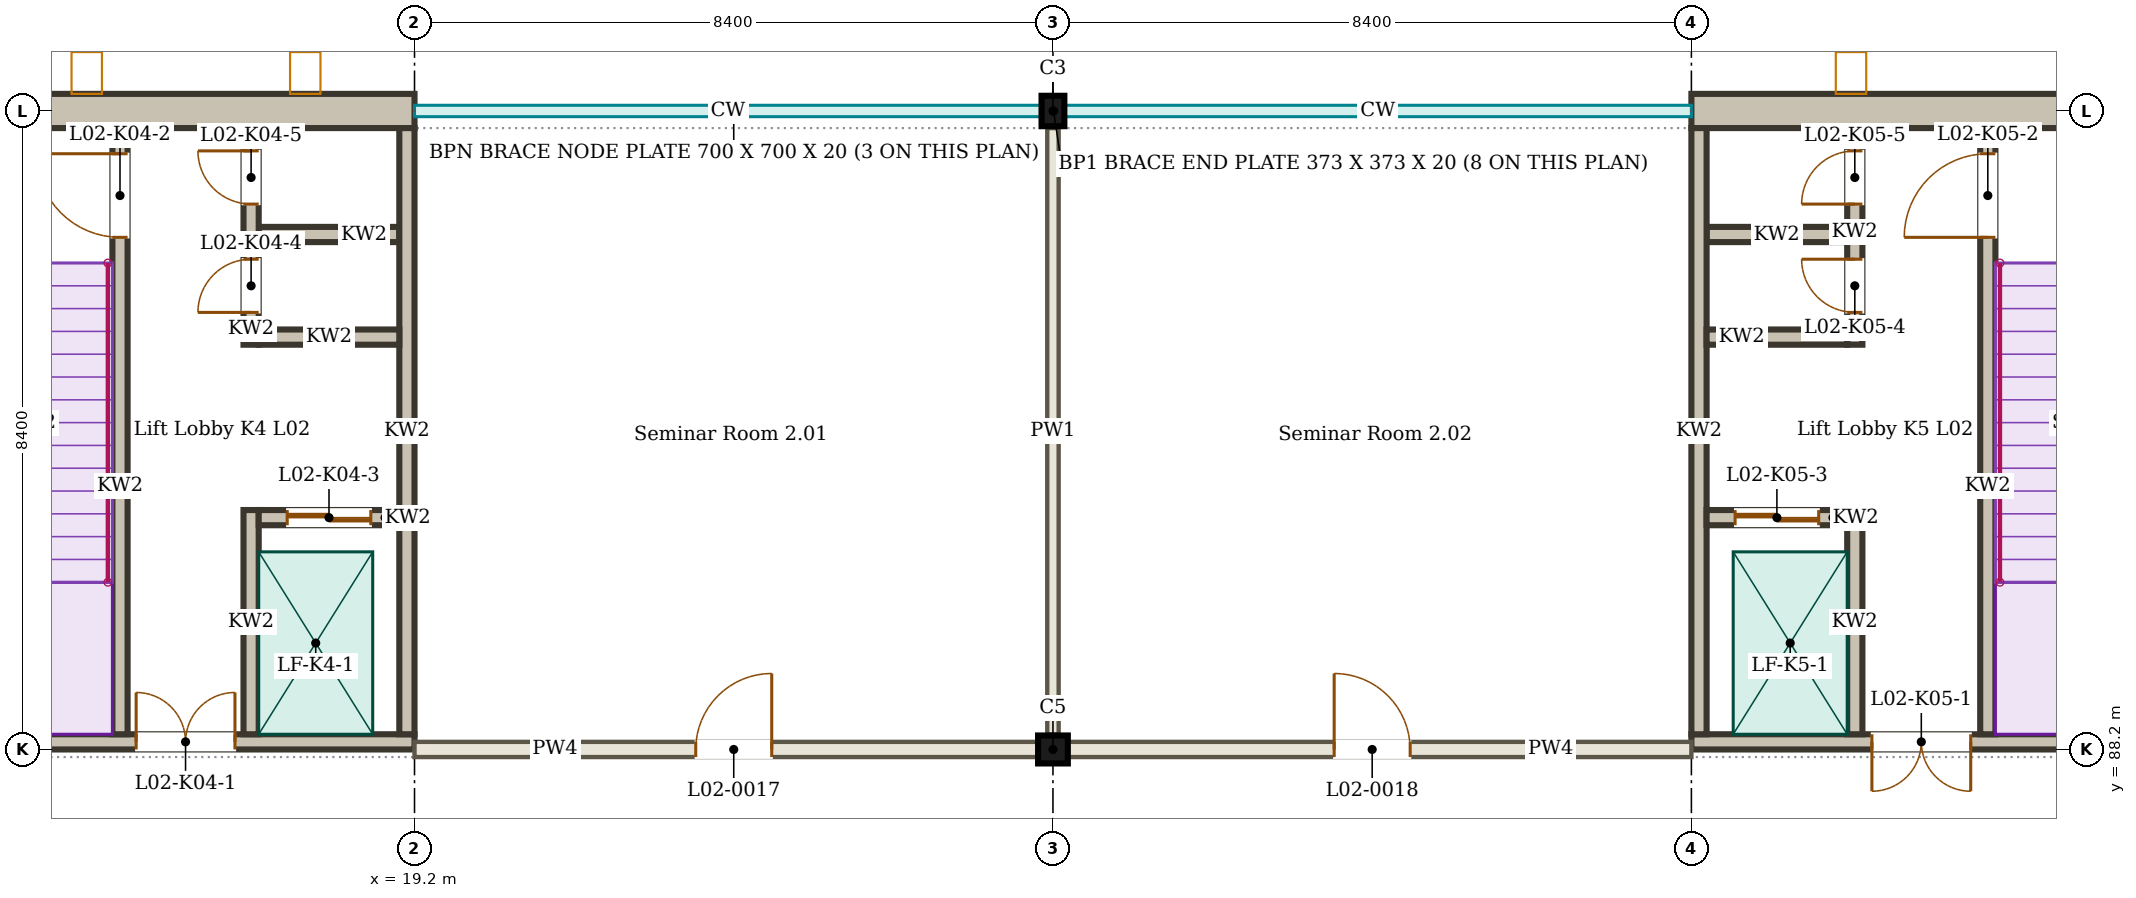
"""IFC4 building model, lengths in metres.
Left out: names, types, materials, properties, quantities, classifications, styles, units other than length and angle.
Written with IfcOpenShell. Run it as: python <this file> out.ifc"""

import sys

from ifc_helpers import new_model, si_unit, direction, frame, frame_2d, origin, origin_2d, place, context, subcontext, project, spatial, rectangle, i_section, extrude, element, fill, save


model = new_model("IFC4")
c1 = context("Model", 3, precision=1e-05, world=origin(), true_north=direction((0.0, 1.0)))
c2 = subcontext(c1, "Body", "Model", "MODEL_VIEW")
j1 = project(units=[si_unit("LENGTHUNIT", "METRE"), si_unit("PLANEANGLEUNIT", "RADIAN")], contexts=[c1])
p1 = place(None, origin())
s1 = spatial("IfcSite", under=j1, at=p1, CompositionType="ELEMENT")
p2 = place(p1, origin())
s2 = spatial("IfcBuilding", under=s1, at=p2, CompositionType="ELEMENT")
p3 = place(p2, frame((0.0, 0.0, 9.0)))
s3 = spatial("IfcBuildingStorey", under=s2, at=p3, CompositionType="ELEMENT", Elevation=9.0)
p4 = place(p3, frame((27.6, 88.2, 0.0), z_axis=(0.0, 0.0, 1.0), x_axis=(1.0, 0.0, 0.0)))
e1 = element("IfcColumn", 1, at=p4, inside=s3, PredefinedType="COLUMN", context=c2, shape_type="SweptSolid", body=[
    extrude(i_section(OverallWidth=0.391, OverallDepth=0.368, WebThickness=0.015, FlangeThickness=0.024, FilletRadius=0.027, at=origin_2d()), origin(), (0.0, 0.0, 1.0), 4.5),
])
p5 = place(p3, frame((27.6, 96.6, 0.0), z_axis=(0.0, 0.0, 1.0), x_axis=(1.0, 0.0, 0.0)))
e2 = element("IfcColumn", 2, at=p5, inside=s3, PredefinedType="COLUMN", context=c2, shape_type="SweptSolid", body=[
    extrude(i_section(OverallWidth=0.3, OverallDepth=0.4, WebThickness=0.013, FlangeThickness=0.024, FilletRadius=0.027, at=origin_2d()), origin(), (0.0, 0.0, 1.0), 4.5),
])
p6 = place(p3, frame((19.2, 88.2, 0.0), z_axis=(0.0, 0.0, 1.0), x_axis=(1.0, 0.0, 0.0)))
e3 = element("IfcWall", 3, at=p6, inside=s3, PredefinedType="PARTITIONING", context=c2, shape_type="SweptSolid", body=[
    extrude(rectangle(XDim=8.205, YDim=0.2, at=frame_2d((4.102, 0.0))), origin(), (0.0, 0.0, 1.0), 3.8),
])
p7 = place(p6, frame((3.7, 0.0, 0.0)))
e4 = element("IfcOpeningElement", 4, at=p7, cuts=e3, PredefinedType="OPENING", context=c2, shape_type="SweptSolid", body=[
    extrude(rectangle(XDim=1.0, YDim=2.1, at=frame_2d((0.5, 1.05))), frame((0.0, 0.11, 0.0), z_axis=(0.0, -1.0, 0.0), x_axis=(1.0, 0.0, 0.0)), (0.0, 0.0, 1.0), 0.22),
])
p8 = place(p3, frame((27.795, 88.2, 0.0), z_axis=(0.0, 0.0, 1.0), x_axis=(1.0, 0.0, 0.0)))
e5 = element("IfcWall", 5, at=p8, inside=s3, PredefinedType="PARTITIONING", context=c2, shape_type="SweptSolid", body=[
    extrude(rectangle(XDim=8.205, YDim=0.2, at=frame_2d((4.102, 0.0))), origin(), (0.0, 0.0, 1.0), 3.8),
])
p9 = place(p8, frame((3.504, 0.0, 0.0)))
e6 = element("IfcOpeningElement", 6, at=p9, cuts=e5, PredefinedType="OPENING", context=c2, shape_type="SweptSolid", body=[
    extrude(rectangle(XDim=1.0, YDim=2.1, at=frame_2d((0.5, 1.05))), frame((0.0, 0.11, 0.0), z_axis=(0.0, -1.0, 0.0), x_axis=(1.0, 0.0, 0.0)), (0.0, 0.0, 1.0), 0.22),
])
p10 = place(p3, frame((27.6, 88.396, 0.0), z_axis=(0.0, 0.0, 1.0), x_axis=(0.0, 1.0, 0.0)))
e7 = element("IfcWall", 7, at=p10, inside=s3, PredefinedType="PARTITIONING", context=c2, shape_type="SweptSolid", body=[
    extrude(rectangle(XDim=7.979, YDim=0.15, at=frame_2d((3.99, 0.0))), origin(), (0.0, 0.0, 1.0), 3.8),
])
p11 = place(p3, frame((11.025, 88.3, 0.0), z_axis=(0.0, 0.0, 1.0), x_axis=(1.0, 0.0, 0.0)))
e8 = element("IfcWall", 8, at=p11, inside=s3, PredefinedType="SOLIDWALL", context=c2, shape_type="SweptSolid", body=[
    extrude(rectangle(XDim=8.175, YDim=0.2, at=frame_2d((4.087, 0.0))), origin(), (0.0, 0.0, 1.0), 4.5),
])
p12 = place(p11, frame((4.512, 0.0, 0.0)))
e9 = element("IfcOpeningElement", 9, at=p12, cuts=e8, PredefinedType="OPENING", context=c2, shape_type="SweptSolid", body=[
    extrude(rectangle(XDim=1.3, YDim=2.1, at=frame_2d((0.65, 1.05))), frame((0.0, 0.11, 0.0), z_axis=(0.0, -1.0, 0.0), x_axis=(1.0, 0.0, 0.0)), (0.0, 0.0, 1.0), 0.22),
])
p13 = place(p3, frame((10.575, 96.6, 0.0), z_axis=(0.0, 0.0, 1.0), x_axis=(1.0, 0.0, 0.0)))
e10 = element("IfcWall", 10, at=p13, inside=s3, PredefinedType="SOLIDWALL", context=c2, shape_type="SweptSolid", body=[
    extrude(rectangle(XDim=8.625, YDim=0.45, at=frame_2d((4.312, 0.0))), origin(), (0.0, 0.0, 1.0), 4.5),
])
p14 = place(p3, frame((19.1, 88.4, 0.0), z_axis=(0.0, 0.0, 1.0), x_axis=(0.0, 1.0, 0.0)))
e11 = element("IfcWall", 11, at=p14, inside=s3, PredefinedType="SOLIDWALL", context=c2, shape_type="SweptSolid", body=[
    extrude(rectangle(XDim=7.975, YDim=0.2, at=frame_2d((3.988, 0.0))), origin(), (0.0, 0.0, 1.0), 4.5),
])
p15 = place(p3, frame((15.325, 88.4, 0.0), z_axis=(0.0, 0.0, 1.0), x_axis=(0.0, 1.0, 0.0)))
e12 = element("IfcWall", 12, at=p15, inside=s3, PredefinedType="SOLIDWALL", context=c2, shape_type="SweptSolid", body=[
    extrude(rectangle(XDim=7.975, YDim=0.2, at=frame_2d((3.988, 0.0))), origin(), (0.0, 0.0, 1.0), 4.5),
])
p16 = place(p15, frame((6.538, 0.0, 0.0)))
e13 = element("IfcOpeningElement", 13, at=p16, cuts=e12, PredefinedType="OPENING", context=c2, shape_type="SweptSolid", body=[
    extrude(rectangle(XDim=1.1, YDim=2.1, at=frame_2d((0.55, 1.05))), frame((0.0, 0.11, 0.0), z_axis=(0.0, -1.0, 0.0), x_axis=(1.0, 0.0, 0.0)), (0.0, 0.0, 1.0), 0.22),
])
p17 = place(p3, frame((17.05, 88.4, 0.0), z_axis=(0.0, 0.0, 1.0), x_axis=(0.0, 1.0, 0.0)))
e14 = element("IfcWall", 14, at=p17, inside=s3, PredefinedType="SOLIDWALL", context=c2, shape_type="SweptSolid", body=[
    extrude(rectangle(XDim=2.95, YDim=0.2, at=frame_2d((1.475, 0.0))), origin(), (0.0, 0.0, 1.0), 4.5),
])
p18 = place(p3, frame((17.05, 93.525, 0.0), z_axis=(0.0, 0.0, 1.0), x_axis=(0.0, 1.0, 0.0)))
e15 = element("IfcWall", 15, at=p18, inside=s3, PredefinedType="SOLIDWALL", context=c2, shape_type="SweptSolid", body=[
    extrude(rectangle(XDim=2.85, YDim=0.2, at=frame_2d((1.425, 0.0))), origin(), (0.0, 0.0, 1.0), 4.35),
])
p19 = place(p18, frame((0.425, 0.0, 0.0)))
e16 = element("IfcOpeningElement", 16, at=p19, cuts=e15, PredefinedType="OPENING", context=c2, shape_type="SweptSolid", body=[
    extrude(rectangle(XDim=0.7, YDim=2.1, at=frame_2d((0.35, 1.05))), frame((0.0, 0.11, 0.0), z_axis=(0.0, -1.0, 0.0), x_axis=(1.0, 0.0, 0.0)), (0.0, 0.0, 1.0), 0.22),
])
p20 = place(p18, frame((1.85, 0.0, 0.0)))
e17 = element("IfcOpeningElement", 17, at=p20, cuts=e15, PredefinedType="OPENING", context=c2, shape_type="SweptSolid", body=[
    extrude(rectangle(XDim=0.7, YDim=2.1, at=frame_2d((0.35, 1.05))), frame((0.0, 0.11, 0.0), z_axis=(0.0, -1.0, 0.0), x_axis=(1.0, 0.0, 0.0)), (0.0, 0.0, 1.0), 0.22),
])
p21 = place(p3, frame((17.15, 91.25, 0.0), z_axis=(0.0, 0.0, 1.0), x_axis=(1.0, 0.0, 0.0)))
e18 = element("IfcWall", 18, at=p21, inside=s3, PredefinedType="SOLIDWALL", context=c2, shape_type="SweptSolid", body=[
    extrude(rectangle(XDim=1.85, YDim=0.2, at=frame_2d((0.925, 0.0))), origin(), (0.0, 0.0, 1.0), 4.5),
])
p22 = place(p21, frame((0.375, 0.0, 0.0)))
e19 = element("IfcOpeningElement", 19, at=p22, cuts=e18, PredefinedType="OPENING", context=c2, shape_type="SweptSolid", body=[
    extrude(rectangle(XDim=1.1, YDim=2.1, at=frame_2d((0.55, 1.05))), frame((0.0, 0.11, 0.0), z_axis=(0.0, -1.0, 0.0), x_axis=(1.0, 0.0, 0.0)), (0.0, 0.0, 1.0), 0.22),
])
for number, where, z_axis, x_axis in (
    (20, (17.15, 93.625, 0.0), (0.0, 0.0, 1.0), (1.0, 0.0, 0.0)),
    (21, (17.15, 94.975, 0.0), (0.0, 0.0, 1.0), (1.0, 0.0, 0.0)),
):
    element("IfcWall", number, at=place(p3, frame(where, z_axis=z_axis, x_axis=x_axis)), inside=s3, PredefinedType="SOLIDWALL", context=c2, shape_type="SweptSolid", body=[
        extrude(rectangle(XDim=1.85, YDim=0.2, at=frame_2d((0.925, 0.0))), origin(), (0.0, 0.0, 1.0), 4.35),
    ])
p23 = place(p3, frame((44.4, 88.3, 0.0), z_axis=(0.0, 0.0, 1.0), x_axis=(-1.0, 0.0, 0.0)))
e22 = element("IfcWall", 22, at=p23, inside=s3, PredefinedType="SOLIDWALL", context=c2, shape_type="SweptSolid", body=[
    extrude(rectangle(XDim=8.4, YDim=0.2, at=frame_2d((4.2, 0.0))), origin(), (0.0, 0.0, 1.0), 4.5),
])
p24 = place(p23, frame((4.725, 0.0, 0.0)))
e23 = element("IfcOpeningElement", 23, at=p24, cuts=e22, PredefinedType="OPENING", context=c2, shape_type="SweptSolid", body=[
    extrude(rectangle(XDim=1.3, YDim=2.1, at=frame_2d((0.65, 1.05))), frame((0.0, 0.11, 0.0), z_axis=(0.0, -1.0, 0.0), x_axis=(1.0, 0.0, 0.0)), (0.0, 0.0, 1.0), 0.22),
])
p25 = place(p3, frame((44.4, 96.6, 0.0), z_axis=(0.0, 0.0, 1.0), x_axis=(-1.0, 0.0, 0.0)))
e24 = element("IfcWall", 24, at=p25, inside=s3, PredefinedType="SOLIDWALL", context=c2, shape_type="SweptSolid", body=[
    extrude(rectangle(XDim=8.4, YDim=0.45, at=frame_2d((4.2, 0.0))), origin(), (0.0, 0.0, 1.0), 4.5),
])
p26 = place(p3, frame((36.1, 88.4, 0.0), z_axis=(0.0, 0.0, 1.0), x_axis=(0.0, 1.0, 0.0)))
e25 = element("IfcWall", 25, at=p26, inside=s3, PredefinedType="SOLIDWALL", context=c2, shape_type="SweptSolid", body=[
    extrude(rectangle(XDim=7.975, YDim=0.2, at=frame_2d((3.988, 0.0))), origin(), (0.0, 0.0, 1.0), 4.5),
])
p27 = place(p3, frame((39.9, 88.4, 0.0), z_axis=(0.0, 0.0, 1.0), x_axis=(0.0, 1.0, 0.0)))
e26 = element("IfcWall", 26, at=p27, inside=s3, PredefinedType="SOLIDWALL", context=c2, shape_type="SweptSolid", body=[
    extrude(rectangle(XDim=7.975, YDim=0.2, at=frame_2d((3.988, 0.0))), origin(), (0.0, 0.0, 1.0), 4.5),
])
p28 = place(p27, frame((6.538, 0.0, 0.0)))
e27 = element("IfcOpeningElement", 27, at=p28, cuts=e26, PredefinedType="OPENING", context=c2, shape_type="SweptSolid", body=[
    extrude(rectangle(XDim=1.1, YDim=2.1, at=frame_2d((0.55, 1.05))), frame((0.0, 0.11, 0.0), z_axis=(0.0, -1.0, 0.0), x_axis=(1.0, 0.0, 0.0)), (0.0, 0.0, 1.0), 0.22),
])
p29 = place(p3, frame((38.15, 88.4, 0.0), z_axis=(0.0, 0.0, 1.0), x_axis=(0.0, 1.0, 0.0)))
e28 = element("IfcWall", 28, at=p29, inside=s3, PredefinedType="SOLIDWALL", context=c2, shape_type="SweptSolid", body=[
    extrude(rectangle(XDim=2.95, YDim=0.2, at=frame_2d((1.475, 0.0))), origin(), (0.0, 0.0, 1.0), 4.5),
])
p30 = place(p3, frame((38.15, 93.525, 0.0), z_axis=(0.0, 0.0, 1.0), x_axis=(0.0, 1.0, 0.0)))
e29 = element("IfcWall", 29, at=p30, inside=s3, PredefinedType="SOLIDWALL", context=c2, shape_type="SweptSolid", body=[
    extrude(rectangle(XDim=2.85, YDim=0.2, at=frame_2d((1.425, 0.0))), origin(), (0.0, 0.0, 1.0), 4.35),
])
p31 = place(p30, frame((0.425, 0.0, 0.0)))
e30 = element("IfcOpeningElement", 30, at=p31, cuts=e29, PredefinedType="OPENING", context=c2, shape_type="SweptSolid", body=[
    extrude(rectangle(XDim=0.7, YDim=2.1, at=frame_2d((0.35, 1.05))), frame((0.0, 0.11, 0.0), z_axis=(0.0, -1.0, 0.0), x_axis=(1.0, 0.0, 0.0)), (0.0, 0.0, 1.0), 0.22),
])
p32 = place(p30, frame((1.85, 0.0, 0.0)))
e31 = element("IfcOpeningElement", 31, at=p32, cuts=e29, PredefinedType="OPENING", context=c2, shape_type="SweptSolid", body=[
    extrude(rectangle(XDim=0.7, YDim=2.1, at=frame_2d((0.35, 1.05))), frame((0.0, 0.11, 0.0), z_axis=(0.0, -1.0, 0.0), x_axis=(1.0, 0.0, 0.0)), (0.0, 0.0, 1.0), 0.22),
])
p33 = place(p3, frame((38.05, 91.25, 0.0), z_axis=(0.0, 0.0, 1.0), x_axis=(-1.0, 0.0, 0.0)))
e32 = element("IfcWall", 32, at=p33, inside=s3, PredefinedType="SOLIDWALL", context=c2, shape_type="SweptSolid", body=[
    extrude(rectangle(XDim=1.85, YDim=0.2, at=frame_2d((0.925, 0.0))), origin(), (0.0, 0.0, 1.0), 4.5),
])
p34 = place(p33, frame((0.375, 0.0, 0.0)))
e33 = element("IfcOpeningElement", 33, at=p34, cuts=e32, PredefinedType="OPENING", context=c2, shape_type="SweptSolid", body=[
    extrude(rectangle(XDim=1.1, YDim=2.1, at=frame_2d((0.55, 1.05))), frame((0.0, 0.11, 0.0), z_axis=(0.0, -1.0, 0.0), x_axis=(1.0, 0.0, 0.0)), (0.0, 0.0, 1.0), 0.22),
])
for number, where, z_axis, x_axis in (
    (34, (38.05, 93.625, 0.0), (0.0, 0.0, 1.0), (-1.0, 0.0, 0.0)),
    (35, (38.05, 94.975, 0.0), (0.0, 0.0, 1.0), (-1.0, 0.0, 0.0)),
):
    element("IfcWall", number, at=place(p3, frame(where, z_axis=z_axis, x_axis=x_axis)), inside=s3, PredefinedType="SOLIDWALL", context=c2, shape_type="SweptSolid", body=[
        extrude(rectangle(XDim=1.85, YDim=0.2, at=frame_2d((0.925, 0.0))), origin(), (0.0, 0.0, 1.0), 4.35),
    ])
p35 = place(p7, origin())
e36 = element("IfcDoor", 36, at=p35, inside=s3, OperationType="SINGLE_SWING_RIGHT", PredefinedType="DOOR", context=c2, shape_type="SweptSolid", body=[
    extrude(rectangle(XDim=1.0, YDim=2.1, at=frame_2d((0.5, 1.05))), frame((0.0, 0.025, 0.0), z_axis=(0.0, -1.0, 0.0), x_axis=(1.0, 0.0, 0.0)), (0.0, 0.0, 1.0), 0.05),
])
fill(e4, e36)
p36 = place(p9, origin())
e37 = element("IfcDoor", 37, at=p36, inside=s3, OperationType="SINGLE_SWING_LEFT", PredefinedType="DOOR", context=c2, shape_type="SweptSolid", body=[
    extrude(rectangle(XDim=1.0, YDim=2.1, at=frame_2d((0.5, 1.05))), frame((0.0, 0.025, 0.0), z_axis=(0.0, -1.0, 0.0), x_axis=(1.0, 0.0, 0.0)), (0.0, 0.0, 1.0), 0.05),
])
fill(e6, e37)
p37 = place(p12, origin())
e38 = element("IfcDoor", 38, at=p37, inside=s3, OperationType="DOUBLE_DOOR_DOUBLE_SWING", PredefinedType="DOOR", context=c2, shape_type="SweptSolid", body=[
    extrude(rectangle(XDim=1.3, YDim=2.1, at=frame_2d((0.65, 1.05))), frame((0.0, 0.025, 0.0), z_axis=(0.0, -1.0, 0.0), x_axis=(1.0, 0.0, 0.0)), (0.0, 0.0, 1.0), 0.05),
])
fill(e9, e38)
p38 = place(p16, origin())
e39 = element("IfcDoor", 39, at=p38, inside=s3, OperationType="SINGLE_SWING_RIGHT", PredefinedType="DOOR", context=c2, shape_type="SweptSolid", body=[
    extrude(rectangle(XDim=1.1, YDim=2.1, at=frame_2d((0.55, 1.05))), frame((0.0, 0.025, 0.0), z_axis=(0.0, -1.0, 0.0), x_axis=(1.0, 0.0, 0.0)), (0.0, 0.0, 1.0), 0.05),
])
fill(e13, e39)
p39 = place(p22, origin())
e40 = element("IfcDoor", 40, at=p39, inside=s3, OperationType="DOUBLE_DOOR_SLIDING", PredefinedType="DOOR", context=c2, shape_type="SweptSolid", body=[
    extrude(rectangle(XDim=1.1, YDim=2.1, at=frame_2d((0.55, 1.05))), frame((0.0, 0.025, 0.0), z_axis=(0.0, -1.0, 0.0), x_axis=(1.0, 0.0, 0.0)), (0.0, 0.0, 1.0), 0.05),
])
fill(e19, e40)
p40 = place(p19, origin())
e41 = element("IfcDoor", 41, at=p40, inside=s3, OperationType="SINGLE_SWING_LEFT", PredefinedType="DOOR", context=c2, shape_type="SweptSolid", body=[
    extrude(rectangle(XDim=0.7, YDim=2.1, at=frame_2d((0.35, 1.05))), frame((0.0, 0.025, 0.0), z_axis=(0.0, -1.0, 0.0), x_axis=(1.0, 0.0, 0.0)), (0.0, 0.0, 1.0), 0.05),
])
fill(e16, e41)
p41 = place(p20, origin())
e42 = element("IfcDoor", 42, at=p41, inside=s3, OperationType="SINGLE_SWING_RIGHT", PredefinedType="DOOR", context=c2, shape_type="SweptSolid", body=[
    extrude(rectangle(XDim=0.7, YDim=2.1, at=frame_2d((0.35, 1.05))), frame((0.0, 0.025, 0.0), z_axis=(0.0, -1.0, 0.0), x_axis=(1.0, 0.0, 0.0)), (0.0, 0.0, 1.0), 0.05),
])
fill(e17, e42)
p42 = place(p24, origin())
e43 = element("IfcDoor", 43, at=p42, inside=s3, OperationType="DOUBLE_DOOR_DOUBLE_SWING", PredefinedType="DOOR", context=c2, shape_type="SweptSolid", body=[
    extrude(rectangle(XDim=1.3, YDim=2.1, at=frame_2d((0.65, 1.05))), frame((0.0, 0.025, 0.0), z_axis=(0.0, -1.0, 0.0), x_axis=(1.0, 0.0, 0.0)), (0.0, 0.0, 1.0), 0.05),
])
fill(e23, e43)
p43 = place(p28, origin())
e44 = element("IfcDoor", 44, at=p43, inside=s3, OperationType="SINGLE_SWING_LEFT", PredefinedType="DOOR", context=c2, shape_type="SweptSolid", body=[
    extrude(rectangle(XDim=1.1, YDim=2.1, at=frame_2d((0.55, 1.05))), frame((0.0, 0.025, 0.0), z_axis=(0.0, -1.0, 0.0), x_axis=(1.0, 0.0, 0.0)), (0.0, 0.0, 1.0), 0.05),
])
fill(e27, e44)
p44 = place(p34, origin())
e45 = element("IfcDoor", 45, at=p44, inside=s3, OperationType="DOUBLE_DOOR_SLIDING", PredefinedType="DOOR", context=c2, shape_type="SweptSolid", body=[
    extrude(rectangle(XDim=1.1, YDim=2.1, at=frame_2d((0.55, 1.05))), frame((0.0, 0.025, 0.0), z_axis=(0.0, -1.0, 0.0), x_axis=(1.0, 0.0, 0.0)), (0.0, 0.0, 1.0), 0.05),
])
fill(e33, e45)
p45 = place(p31, origin())
e46 = element("IfcDoor", 46, at=p45, inside=s3, OperationType="SINGLE_SWING_RIGHT", PredefinedType="DOOR", context=c2, shape_type="SweptSolid", body=[
    extrude(rectangle(XDim=0.7, YDim=2.1, at=frame_2d((0.35, 1.05))), frame((0.0, 0.025, 0.0), z_axis=(0.0, -1.0, 0.0), x_axis=(1.0, 0.0, 0.0)), (0.0, 0.0, 1.0), 0.05),
])
fill(e30, e46)
p46 = place(p32, origin())
e47 = element("IfcDoor", 47, at=p46, inside=s3, OperationType="SINGLE_SWING_LEFT", PredefinedType="DOOR", context=c2, shape_type="SweptSolid", body=[
    extrude(rectangle(XDim=0.7, YDim=2.1, at=frame_2d((0.35, 1.05))), frame((0.0, 0.025, 0.0), z_axis=(0.0, -1.0, 0.0), x_axis=(1.0, 0.0, 0.0)), (0.0, 0.0, 1.0), 0.05),
])
fill(e31, e47)
save(model, sys.argv[1])
